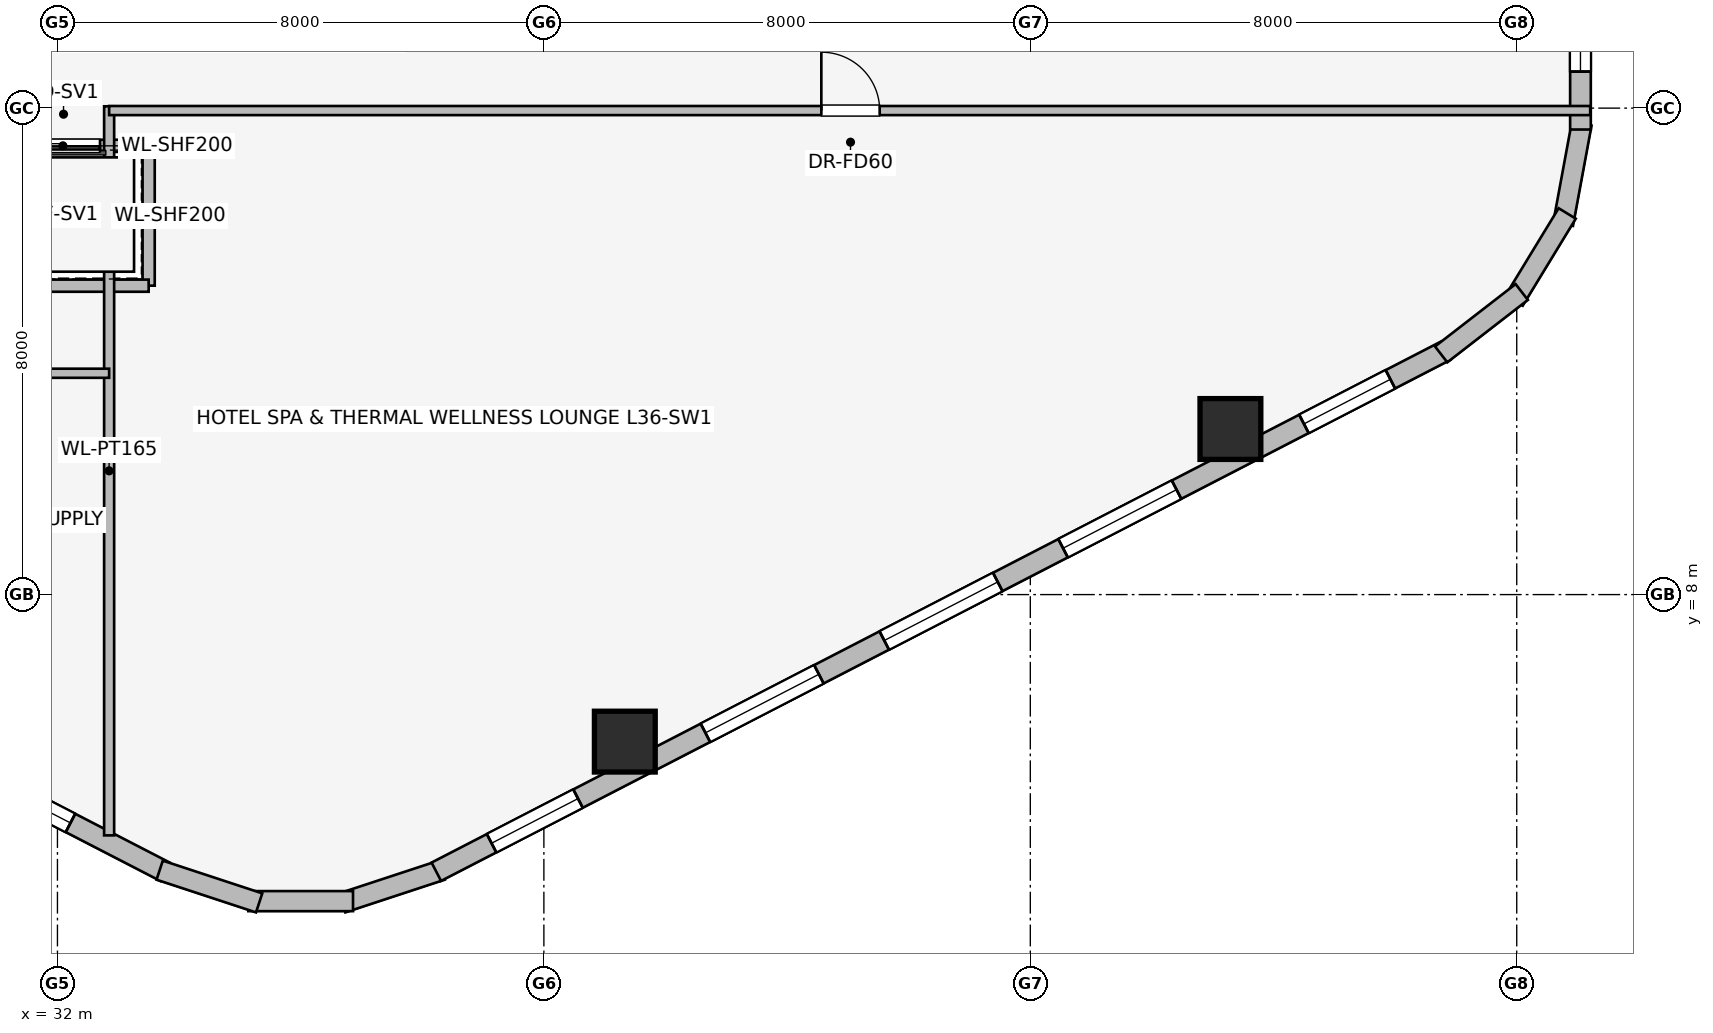
"""IFC4 building model, lengths in metres.
Left out: names, types, materials, properties, quantities, classifications, styles, units other than length and angle.
Written with IfcOpenShell. Run it as: python <this file> out.ifc"""

import sys

from ifc_helpers import new_model, si_unit, direction, frame, frame_2d, origin, origin_2d, place, context, subcontext, project, spatial, rectangle, extrude, element, fill, save


model = new_model("IFC4")
c1 = context("Model", 3, precision=1e-05, world=origin(), true_north=direction((0.0, 1.0)))
c2 = subcontext(c1, "Body", "Model", "MODEL_VIEW")
j1 = project(units=[si_unit("LENGTHUNIT", "METRE"), si_unit("PLANEANGLEUNIT", "RADIAN")], contexts=[c1])
p1 = place(None, origin())
s1 = spatial("IfcSite", under=j1, at=p1, CompositionType="ELEMENT")
p2 = place(p1, origin())
s2 = spatial("IfcBuilding", under=s1, at=p2, CompositionType="ELEMENT")
p3 = place(p2, frame((0.0, 0.0, 136.05)))
s3 = spatial("IfcBuildingStorey", under=s2, at=p3, CompositionType="ELEMENT", Elevation=136.05)
for number, where, z_axis, x_axis in (
    (1, (41.331, 5.582, 0.0), (0.0, 0.0, 1.0), (1.0, 0.0, 0.0)),
    (2, (51.291, 10.723, 0.0), (0.0, 0.0, 1.0), (1.0, 0.0, 0.0)),
):
    element("IfcColumn", number, at=place(p3, frame(where, z_axis=z_axis, x_axis=x_axis)), inside=s3, PredefinedType="COLUMN", context=c2, shape_type="SweptSolid", body=[
        extrude(rectangle(XDim=1.0, YDim=1.0, at=origin_2d()), origin(), (0.0, 0.0, 1.0), 3.45),
    ])
p4 = place(p3, frame((33.769, 3.442, 0.0), z_axis=(0.0, 0.0, 1.0), x_axis=(-0.888613612362, 0.458656568606, 0.0)))
e3 = element("IfcWall", 3, at=p4, inside=s3, PredefinedType="STANDARD", context=c2, shape_type="SweptSolid", body=[
    extrude(rectangle(XDim=18.681, YDim=0.34, at=frame_2d((9.34, 0.0))), origin(), (0.0, 0.0, 1.0), 3.16),
])
p5 = place(p4, frame((1.75, 0.0, 0.75)))
e4 = element("IfcOpeningElement", 4, at=p5, cuts=e3, PredefinedType="OPENING", context=c2, shape_type="SweptSolid", body=[
    extrude(rectangle(XDim=1.05, YDim=1.4, at=frame_2d((0.525, 0.7))), frame((0.0, 0.18, 0.0), z_axis=(0.0, -1.0, 0.0), x_axis=(1.0, 0.0, 0.0)), (0.0, 0.0, 1.0), 0.36),
])
p6 = place(p4, frame((4.765, 0.0, 0.75)))
e5 = element("IfcOpeningElement", 5, at=p6, cuts=e3, PredefinedType="OPENING", context=c2, shape_type="SweptSolid", body=[
    extrude(rectangle(XDim=2.1, YDim=1.5, at=frame_2d((1.05, 0.75))), frame((0.0, 0.18, 0.0), z_axis=(0.0, -1.0, 0.0), x_axis=(1.0, 0.0, 0.0)), (0.0, 0.0, 1.0), 0.36),
])
p7 = place(p4, frame((7.644, 0.0, 0.75)))
e6 = element("IfcOpeningElement", 6, at=p7, cuts=e3, PredefinedType="OPENING", context=c2, shape_type="SweptSolid", body=[
    extrude(rectangle(XDim=2.1, YDim=1.5, at=frame_2d((1.05, 0.75))), frame((0.0, 0.18, 0.0), z_axis=(0.0, -1.0, 0.0), x_axis=(1.0, 0.0, 0.0)), (0.0, 0.0, 1.0), 0.36),
])
p8 = place(p4, frame((11.774, 0.0, 0.75)))
e7 = element("IfcOpeningElement", 7, at=p8, cuts=e3, PredefinedType="OPENING", context=c2, shape_type="SweptSolid", body=[
    extrude(rectangle(XDim=1.6, YDim=1.55, at=frame_2d((0.8, 0.775))), frame((0.0, 0.18, 0.0), z_axis=(0.0, -1.0, 0.0), x_axis=(1.0, 0.0, 0.0)), (0.0, 0.0, 1.0), 0.36),
])
p9 = place(p4, frame((15.92, 0.0, 0.75)))
e8 = element("IfcOpeningElement", 8, at=p9, cuts=e3, PredefinedType="OPENING", context=c2, shape_type="SweptSolid", body=[
    extrude(rectangle(XDim=1.05, YDim=1.4, at=frame_2d((0.525, 0.7))), frame((0.0, 0.18, 0.0), z_axis=(0.0, -1.0, 0.0), x_axis=(1.0, 0.0, 0.0)), (0.0, 0.0, 1.0), 0.36),
])
for number, where, z_axis, x_axis in (
    (9, (38.319, 3.468, 0.0), (0.0, 0.0, 1.0), (-0.95, -0.312, 0.0)),
    (10, (36.861, 2.959, 0.0), (0.0, 0.0, 1.0), (-1.0, 0.0, 0.0)),
    (11, (35.317, 2.93, 0.0), (0.0, 0.0, 1.0), (-0.95, 0.312, 0.0)),
):
    element("IfcWall", number, at=place(p3, frame(where, z_axis=z_axis, x_axis=x_axis)), inside=s3, PredefinedType="STANDARD", context=c2, shape_type="SweptSolid", body=[
        extrude(rectangle(XDim=1.722, YDim=0.33, at=frame_2d((0.861, 0.0))), origin(), (0.0, 0.0, 1.0), 3.16),
    ])
p10 = place(p3, frame((54.831, 12.01, 0.0), z_axis=(0.0, 0.0, 1.0), x_axis=(-0.888613612362, -0.458656568606, 0.0)))
e12 = element("IfcWall", 12, at=p10, inside=s3, PredefinedType="STANDARD", context=c2, shape_type="SweptSolid", body=[
    extrude(rectangle(XDim=18.681, YDim=0.34, at=frame_2d((9.34, 0.0))), origin(), (0.0, 0.0, 1.0), 3.16),
])
p11 = place(p10, frame((1.023, 0.0, 0.75)))
e13 = element("IfcOpeningElement", 13, at=p11, cuts=e12, PredefinedType="OPENING", context=c2, shape_type="SweptSolid", body=[
    extrude(rectangle(XDim=1.6, YDim=1.55, at=frame_2d((0.8, 0.775))), frame((0.0, 0.18, 0.0), z_axis=(0.0, -1.0, 0.0), x_axis=(1.0, 0.0, 0.0)), (0.0, 0.0, 1.0), 0.36),
])
p12 = place(p10, frame((4.981, 0.0, 0.75)))
e14 = element("IfcOpeningElement", 14, at=p12, cuts=e12, PredefinedType="OPENING", context=c2, shape_type="SweptSolid", body=[
    extrude(rectangle(XDim=2.1, YDim=1.5, at=frame_2d((1.05, 0.75))), frame((0.0, 0.18, 0.0), z_axis=(0.0, -1.0, 0.0), x_axis=(1.0, 0.0, 0.0)), (0.0, 0.0, 1.0), 0.36),
])
p13 = place(p10, frame((8.29, 0.0, 0.75)))
e15 = element("IfcOpeningElement", 15, at=p13, cuts=e12, PredefinedType="OPENING", context=c2, shape_type="SweptSolid", body=[
    extrude(rectangle(XDim=2.1, YDim=1.5, at=frame_2d((1.05, 0.75))), frame((0.0, 0.18, 0.0), z_axis=(0.0, -1.0, 0.0), x_axis=(1.0, 0.0, 0.0)), (0.0, 0.0, 1.0), 0.36),
])
p14 = place(p10, frame((11.6, 0.0, 0.75)))
e16 = element("IfcOpeningElement", 16, at=p14, cuts=e12, PredefinedType="OPENING", context=c2, shape_type="SweptSolid", body=[
    extrude(rectangle(XDim=2.1, YDim=1.5, at=frame_2d((1.05, 0.75))), frame((0.0, 0.18, 0.0), z_axis=(0.0, -1.0, 0.0), x_axis=(1.0, 0.0, 0.0)), (0.0, 0.0, 1.0), 0.36),
])
p15 = place(p10, frame((16.058, 0.0, 0.75)))
e17 = element("IfcOpeningElement", 17, at=p15, cuts=e12, PredefinedType="OPENING", context=c2, shape_type="SweptSolid", body=[
    extrude(rectangle(XDim=1.6, YDim=1.55, at=frame_2d((0.8, 0.775))), frame((0.0, 0.18, 0.0), z_axis=(0.0, -1.0, 0.0), x_axis=(1.0, 0.0, 0.0)), (0.0, 0.0, 1.0), 0.36),
])
p16 = place(p3, frame((57.068, 15.742, 0.0), z_axis=(0.0, 0.0, 1.0), x_axis=(-0.181984991895, -0.983301308209, 0.0)))
e18 = element("IfcWall", 18, at=p16, inside=s3, PredefinedType="STANDARD", context=c2, shape_type="SweptSolid", body=[
    extrude(rectangle(XDim=1.677, YDim=0.33, at=frame_2d((0.838, 0.0))), origin(), (0.0, 0.0, 1.0), 3.16),
])
p17 = place(p3, frame((56.83, 14.268, 0.0), z_axis=(0.0, 0.0, 1.0), x_axis=(-0.520519429557, -0.853849824883, 0.0)))
e19 = element("IfcWall", 19, at=p17, inside=s3, PredefinedType="STANDARD", context=c2, shape_type="SweptSolid", body=[
    extrude(rectangle(XDim=1.677, YDim=0.33, at=frame_2d((0.839, 0.0))), origin(), (0.0, 0.0, 1.0), 3.16),
])
p18 = place(p3, frame((56.082, 12.976, 0.0), z_axis=(0.0, 0.0, 1.0), x_axis=(-0.790621329885, -0.612305408053, 0.0)))
e20 = element("IfcWall", 20, at=p18, inside=s3, PredefinedType="STANDARD", context=c2, shape_type="SweptSolid", body=[
    extrude(rectangle(XDim=1.676, YDim=0.33, at=frame_2d((0.838, 0.0))), origin(), (0.0, 0.0, 1.0), 3.16),
])
p19 = place(p3, frame((57.048, 32.352, 0.0), z_axis=(0.0, 0.0, 1.0), x_axis=(0.0, -1.0, 0.0)))
e21 = element("IfcWall", 21, at=p19, inside=s3, PredefinedType="STANDARD", context=c2, shape_type="SweptSolid", body=[
    extrude(rectangle(XDim=16.704, YDim=0.34, at=frame_2d((8.352, 0.0))), origin(), (0.0, 0.0, 1.0), 3.16),
])
p20 = place(p19, frame((0.992, 0.0, 0.75)))
e22 = element("IfcOpeningElement", 22, at=p20, cuts=e21, PredefinedType="OPENING", context=c2, shape_type="SweptSolid", body=[
    extrude(rectangle(XDim=1.05, YDim=1.4, at=frame_2d((0.525, 0.7))), frame((0.0, 0.18, 0.0), z_axis=(0.0, -1.0, 0.0), x_axis=(1.0, 0.0, 0.0)), (0.0, 0.0, 1.0), 0.36),
])
p21 = place(p19, frame((4.935, 0.0, 0.75)))
e23 = element("IfcOpeningElement", 23, at=p21, cuts=e21, PredefinedType="OPENING", context=c2, shape_type="SweptSolid", body=[
    extrude(rectangle(XDim=2.1, YDim=1.5, at=frame_2d((1.05, 0.75))), frame((0.0, 0.18, 0.0), z_axis=(0.0, -1.0, 0.0), x_axis=(1.0, 0.0, 0.0)), (0.0, 0.0, 1.0), 0.36),
])
p22 = place(p19, frame((9.919, 0.0, 0.75)))
e24 = element("IfcOpeningElement", 24, at=p22, cuts=e21, PredefinedType="OPENING", context=c2, shape_type="SweptSolid", body=[
    extrude(rectangle(XDim=1.6, YDim=1.55, at=frame_2d((0.8, 0.775))), frame((0.0, 0.18, 0.0), z_axis=(0.0, -1.0, 0.0), x_axis=(1.0, 0.0, 0.0)), (0.0, 0.0, 1.0), 0.36),
])
p23 = place(p19, frame((14.702, 0.0, 0.75)))
e25 = element("IfcOpeningElement", 25, at=p23, cuts=e21, PredefinedType="OPENING", context=c2, shape_type="SweptSolid", body=[
    extrude(rectangle(XDim=1.05, YDim=1.4, at=frame_2d((0.525, 0.7))), frame((0.0, 0.18, 0.0), z_axis=(0.0, -1.0, 0.0), x_axis=(1.0, 0.0, 0.0)), (0.0, 0.0, 1.0), 0.36),
])
p24 = place(p3, frame((33.5, 15.38, 0.0), z_axis=(0.0, 0.0, 1.0), x_axis=(-1.0, 0.0, 0.0)))
e26 = element("IfcWall", 26, at=p24, inside=s3, PredefinedType="PARTITIONING", context=c2, shape_type="SweptSolid", body=[
    extrude(rectangle(XDim=2.82, YDim=0.2, at=frame_2d((1.41, 0.0))), origin(), (0.0, 0.0, 1.0), 3.16),
])
p25 = place(p24, frame((0.8, 0.0, 0.0)))
e27 = element("IfcOpeningElement", 27, at=p25, cuts=e26, PredefinedType="OPENING", context=c2, shape_type="SweptSolid", body=[
    extrude(rectangle(XDim=1.2, YDim=2.2, at=frame_2d((0.6, 1.1))), frame((0.0, 0.11, 0.0), z_axis=(0.0, -1.0, 0.0), x_axis=(1.0, 0.0, 0.0)), (0.0, 0.0, 1.0), 0.22),
])
p26 = place(p3, frame((33.5, 13.08, 0.0), z_axis=(0.0, 0.0, 1.0), x_axis=(0.0, 1.0, 0.0)))
e28 = element("IfcWall", 28, at=p26, inside=s3, PredefinedType="PARTITIONING", context=c2, shape_type="SweptSolid", body=[
    extrude(rectangle(XDim=2.3, YDim=0.2, at=frame_2d((1.15, 0.0))), origin(), (0.0, 0.0, 1.0), 3.16),
])
p27 = place(p3, frame((30.879, 13.08, 0.0), z_axis=(0.0, 0.0, 1.0), x_axis=(1.0, 0.0, 0.0)))
e29 = element("IfcWall", 29, at=p27, inside=s3, PredefinedType="PARTITIONING", context=c2, shape_type="SweptSolid", body=[
    extrude(rectangle(XDim=2.621, YDim=0.2, at=frame_2d((1.311, 0.0))), origin(), (0.0, 0.0, 1.0), 3.16),
])
p28 = place(p3, frame((32.85, 4.04, 0.0), z_axis=(0.0, 0.0, 1.0), x_axis=(0.0, 1.0, 0.0)))
e30 = element("IfcWall", 30, at=p28, inside=s3, PredefinedType="PARTITIONING", context=c2, shape_type="SweptSolid", body=[
    extrude(rectangle(XDim=11.99, YDim=0.165, at=frame_2d((5.995, 0.0))), origin(), (0.0, 0.0, 1.0), 3.16),
])
p29 = place(p3, frame((18.126, 11.64, 0.0), z_axis=(0.0, 0.0, 1.0), x_axis=(1.0, 0.0, 0.0)))
e31 = element("IfcWall", 31, at=p29, inside=s3, PredefinedType="PARTITIONING", context=c2, shape_type="SweptSolid", body=[
    extrude(rectangle(XDim=14.724, YDim=0.15, at=frame_2d((7.362, 0.0))), origin(), (0.0, 0.0, 1.0), 3.16),
])
p30 = place(p29, frame((4.274, 0.0, 0.0)))
e32 = element("IfcOpeningElement", 32, at=p30, cuts=e31, PredefinedType="OPENING", context=c2, shape_type="SweptSolid", body=[
    extrude(rectangle(XDim=0.9, YDim=2.0, at=frame_2d((0.45, 1.0))), frame((0.0, 0.085, 0.0), z_axis=(0.0, -1.0, 0.0), x_axis=(1.0, 0.0, 0.0)), (0.0, 0.0, 1.0), 0.17),
])
p31 = place(p29, frame((7.724, 0.0, 0.0)))
e33 = element("IfcOpeningElement", 33, at=p31, cuts=e31, PredefinedType="OPENING", context=c2, shape_type="SweptSolid", body=[
    extrude(rectangle(XDim=0.9, YDim=2.0, at=frame_2d((0.45, 1.0))), frame((0.0, 0.085, 0.0), z_axis=(0.0, -1.0, 0.0), x_axis=(1.0, 0.0, 0.0)), (0.0, 0.0, 1.0), 0.17),
])
p32 = place(p3, frame((32.85, 15.96, 0.0), z_axis=(0.0, 0.0, 1.0), x_axis=(1.0, 0.0, 0.0)))
e34 = element("IfcWall", 34, at=p32, inside=s3, PredefinedType="PARTITIONING", context=c2, shape_type="SweptSolid", body=[
    extrude(rectangle(XDim=24.358, YDim=0.15, at=frame_2d((12.179, 0.0))), origin(), (0.0, 0.0, 1.0), 3.16),
])
p33 = place(p32, frame((11.713, 0.0, 0.0)))
e35 = element("IfcOpeningElement", 35, at=p33, cuts=e34, PredefinedType="OPENING", context=c2, shape_type="SweptSolid", body=[
    extrude(rectangle(XDim=0.96, YDim=2.0, at=frame_2d((0.48, 1.0))), frame((0.0, 0.085, 0.0), z_axis=(0.0, -1.0, 0.0), x_axis=(1.0, 0.0, 0.0)), (0.0, 0.0, 1.0), 0.17),
])
p34 = place(p5, origin())
e36 = element("IfcWindow", 36, at=p34, inside=s3, PartitioningType="SINGLE_PANEL", PredefinedType="WINDOW", context=c2, shape_type="SweptSolid", body=[
    extrude(rectangle(XDim=1.05, YDim=1.4, at=frame_2d((0.525, 0.7))), frame((0.0, 0.03, 0.0), z_axis=(0.0, -1.0, 0.0), x_axis=(1.0, 0.0, 0.0)), (0.0, 0.0, 1.0), 0.06),
])
fill(e4, e36)
p35 = place(p11, origin())
e37 = element("IfcWindow", 37, at=p35, inside=s3, PartitioningType="SINGLE_PANEL", PredefinedType="WINDOW", context=c2, shape_type="SweptSolid", body=[
    extrude(rectangle(XDim=1.6, YDim=1.55, at=frame_2d((0.8, 0.775))), frame((0.0, 0.03, 0.0), z_axis=(0.0, -1.0, 0.0), x_axis=(1.0, 0.0, 0.0)), (0.0, 0.0, 1.0), 0.06),
])
fill(e13, e37)
p36 = place(p12, origin())
e38 = element("IfcWindow", 38, at=p36, inside=s3, PartitioningType="SINGLE_PANEL", PredefinedType="WINDOW", context=c2, shape_type="SweptSolid", body=[
    extrude(rectangle(XDim=2.1, YDim=1.5, at=frame_2d((1.05, 0.75))), frame((0.0, 0.03, 0.0), z_axis=(0.0, -1.0, 0.0), x_axis=(1.0, 0.0, 0.0)), (0.0, 0.0, 1.0), 0.06),
])
fill(e14, e38)
p37 = place(p13, origin())
e39 = element("IfcWindow", 39, at=p37, inside=s3, PartitioningType="SINGLE_PANEL", PredefinedType="WINDOW", context=c2, shape_type="SweptSolid", body=[
    extrude(rectangle(XDim=2.1, YDim=1.5, at=frame_2d((1.05, 0.75))), frame((0.0, 0.03, 0.0), z_axis=(0.0, -1.0, 0.0), x_axis=(1.0, 0.0, 0.0)), (0.0, 0.0, 1.0), 0.06),
])
fill(e15, e39)
p38 = place(p14, origin())
e40 = element("IfcWindow", 40, at=p38, inside=s3, PartitioningType="SINGLE_PANEL", PredefinedType="WINDOW", context=c2, shape_type="SweptSolid", body=[
    extrude(rectangle(XDim=2.1, YDim=1.5, at=frame_2d((1.05, 0.75))), frame((0.0, 0.03, 0.0), z_axis=(0.0, -1.0, 0.0), x_axis=(1.0, 0.0, 0.0)), (0.0, 0.0, 1.0), 0.06),
])
fill(e16, e40)
p39 = place(p15, origin())
e41 = element("IfcWindow", 41, at=p39, inside=s3, PartitioningType="SINGLE_PANEL", PredefinedType="WINDOW", context=c2, shape_type="SweptSolid", body=[
    extrude(rectangle(XDim=1.6, YDim=1.55, at=frame_2d((0.8, 0.775))), frame((0.0, 0.03, 0.0), z_axis=(0.0, -1.0, 0.0), x_axis=(1.0, 0.0, 0.0)), (0.0, 0.0, 1.0), 0.06),
])
fill(e17, e41)
p40 = place(p23, origin())
e42 = element("IfcWindow", 42, at=p40, inside=s3, PartitioningType="SINGLE_PANEL", PredefinedType="WINDOW", context=c2, shape_type="SweptSolid", body=[
    extrude(rectangle(XDim=1.05, YDim=1.4, at=frame_2d((0.525, 0.7))), frame((0.0, 0.03, 0.0), z_axis=(0.0, -1.0, 0.0), x_axis=(1.0, 0.0, 0.0)), (0.0, 0.0, 1.0), 0.06),
])
fill(e25, e42)
p41 = place(p25, origin())
e43 = element("IfcDoor", 43, at=p41, inside=s3, OperationType="SLIDING_TO_RIGHT", PredefinedType="DOOR", context=c2, shape_type="SweptSolid", body=[
    extrude(rectangle(XDim=1.2, YDim=2.2, at=frame_2d((0.6, 1.1))), frame((0.0, 0.025, 0.0), z_axis=(0.0, -1.0, 0.0), x_axis=(1.0, 0.0, 0.0)), (0.0, 0.0, 1.0), 0.05),
])
fill(e27, e43)
p42 = place(p33, origin())
e44 = element("IfcDoor", 44, at=p42, inside=s3, OperationType="SINGLE_SWING_LEFT", PredefinedType="DOOR", context=c2, shape_type="SweptSolid", body=[
    extrude(rectangle(XDim=0.96, YDim=2.0, at=frame_2d((0.48, 1.0))), frame((0.0, 0.025, 0.0), z_axis=(0.0, -1.0, 0.0), x_axis=(1.0, 0.0, 0.0)), (0.0, 0.0, 1.0), 0.05),
])
fill(e35, e44)
save(model, sys.argv[1])
